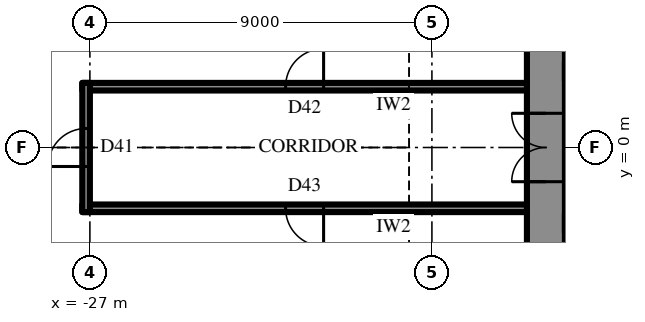
"""IFC4 building model, lengths in metres.
Left out: names, types, materials, properties, quantities, classifications, styles, units other than length and angle.
Written with IfcOpenShell. Run it as: python <this file> out.ifc"""

import sys

from ifc_helpers import new_model, si_unit, direction, frame, frame_2d, origin, place, context, subcontext, project, spatial, rectangle, extrude, element, fill, save


model = new_model("IFC4")
c1 = context("Model", 3, precision=1e-05, world=origin(), true_north=direction((0.0, 1.0)))
c2 = subcontext(c1, "Body", "Model", "MODEL_VIEW")
j1 = project(units=[si_unit("LENGTHUNIT", "METRE"), si_unit("PLANEANGLEUNIT", "RADIAN")], contexts=[c1])
p1 = place(None, origin())
s1 = spatial("IfcSite", under=j1, at=p1, CompositionType="ELEMENT")
p2 = place(p1, origin())
s2 = spatial("IfcBuilding", under=s1, at=p2, CompositionType="ELEMENT")
p3 = place(p2, frame((0.0, 0.0, 215.5)))
s3 = spatial("IfcBuildingStorey", under=s2, at=p3, CompositionType="ELEMENT", Elevation=215.5)
p4 = place(p3, frame((-15.0, 10.7, 0.0), z_axis=(0.0, 0.0, 1.0), x_axis=(0.0, -1.0, 0.0)))
e1 = element("IfcWall", 1, at=p4, inside=s3, PredefinedType="SHEAR", context=c2, shape_type="SweptSolid", body=[
    extrude(rectangle(XDim=21.4, YDim=1.0, at=frame_2d((10.7, 0.0))), origin(), (0.0, 0.0, 1.0), 4.2),
])
p5 = place(p4, frame((9.8, 0.0, 0.0)))
e2 = element("IfcOpeningElement", 2, at=p5, cuts=e1, PredefinedType="OPENING", context=c2, shape_type="SweptSolid", body=[
    extrude(rectangle(XDim=1.8, YDim=2.4, at=frame_2d((0.9, 1.2))), frame((0.0, 0.51, 0.0), z_axis=(0.0, -1.0, 0.0), x_axis=(1.0, 0.0, 0.0)), (0.0, 0.0, 1.0), 1.02),
])
p6 = place(p3, frame((-12.3, -2.0, 0.0), z_axis=(0.0, 0.0, 1.0), x_axis=(-1.0, 0.0, 0.0)))
e3 = element("IfcWall", 3, at=p6, inside=s3, PredefinedType="SHEAR", context=c2, shape_type="SweptSolid", body=[
    extrude(rectangle(XDim=2.2, YDim=0.5, at=frame_2d((1.1, 0.0))), origin(), (0.0, 0.0, 1.0), 4.2),
])
p7 = place(p6, frame((0.8, 0.0, 0.0)))
e4 = element("IfcOpeningElement", 4, at=p7, cuts=e3, PredefinedType="OPENING", context=c2, shape_type="SweptSolid", body=[
    extrude(rectangle(XDim=0.9, YDim=2.2, at=frame_2d((0.45, 1.1))), frame((0.0, 0.26, 0.0), z_axis=(0.0, -1.0, 0.0), x_axis=(1.0, 0.0, 0.0)), (0.0, 0.0, 1.0), 0.52),
])
p8 = place(p3, frame((-31.913, -2.425, 0.0), z_axis=(0.0, 0.0, 1.0), x_axis=(0.500001051461, -0.866024796723, 0.0)))
e5 = element("IfcWall", 5, at=p8, inside=s3, PredefinedType="SOLIDWALL", context=c2, shape_type="SweptSolid", body=[
    extrude(rectangle(XDim=27.713, YDim=0.3, at=frame_2d((13.856, 0.0))), origin(), (0.0, 0.0, 1.0), 2.0),
])
p9 = place(p8, frame((1.309, 0.0, 0.6)))
e6 = element("IfcOpeningElement", 6, at=p9, cuts=e5, PredefinedType="OPENING", context=c2, shape_type="SweptSolid", body=[
    extrude(rectangle(XDim=2.0, YDim=1.15, at=frame_2d((1.0, 0.575))), frame((0.0, 0.16, 0.0), z_axis=(0.0, -1.0, 0.0), x_axis=(1.0, 0.0, 0.0)), (0.0, 0.0, 1.0), 0.32),
])
p10 = place(p8, frame((5.928, 0.0, 0.6)))
e7 = element("IfcOpeningElement", 7, at=p10, cuts=e5, PredefinedType="OPENING", context=c2, shape_type="SweptSolid", body=[
    extrude(rectangle(XDim=2.0, YDim=1.15, at=frame_2d((1.0, 0.575))), frame((0.0, 0.16, 0.0), z_axis=(0.0, -1.0, 0.0), x_axis=(1.0, 0.0, 0.0)), (0.0, 0.0, 1.0), 0.32),
])
p11 = place(p8, frame((10.547, 0.0, 0.6)))
e8 = element("IfcOpeningElement", 8, at=p11, cuts=e5, PredefinedType="OPENING", context=c2, shape_type="SweptSolid", body=[
    extrude(rectangle(XDim=2.0, YDim=1.15, at=frame_2d((1.0, 0.575))), frame((0.0, 0.16, 0.0), z_axis=(0.0, -1.0, 0.0), x_axis=(1.0, 0.0, 0.0)), (0.0, 0.0, 1.0), 0.32),
])
p12 = place(p8, frame((15.166, 0.0, 0.6)))
e9 = element("IfcOpeningElement", 9, at=p12, cuts=e5, PredefinedType="OPENING", context=c2, shape_type="SweptSolid", body=[
    extrude(rectangle(XDim=2.0, YDim=1.15, at=frame_2d((1.0, 0.575))), frame((0.0, 0.16, 0.0), z_axis=(0.0, -1.0, 0.0), x_axis=(1.0, 0.0, 0.0)), (0.0, 0.0, 1.0), 0.32),
])
p13 = place(p8, frame((19.785, 0.0, 0.6)))
e10 = element("IfcOpeningElement", 10, at=p13, cuts=e5, PredefinedType="OPENING", context=c2, shape_type="SweptSolid", body=[
    extrude(rectangle(XDim=2.0, YDim=1.15, at=frame_2d((1.0, 0.575))), frame((0.0, 0.16, 0.0), z_axis=(0.0, -1.0, 0.0), x_axis=(1.0, 0.0, 0.0)), (0.0, 0.0, 1.0), 0.32),
])
p14 = place(p8, frame((24.403, 0.0, 0.6)))
e11 = element("IfcOpeningElement", 11, at=p14, cuts=e5, PredefinedType="OPENING", context=c2, shape_type="SweptSolid", body=[
    extrude(rectangle(XDim=2.0, YDim=1.15, at=frame_2d((1.0, 0.575))), frame((0.0, 0.16, 0.0), z_axis=(0.0, -1.0, 0.0), x_axis=(1.0, 0.0, 0.0)), (0.0, 0.0, 1.0), 0.32),
])
p15 = place(p3, frame((-15.5, 1.6, 0.0), z_axis=(0.0, 0.0, 1.0), x_axis=(-1.0, 0.0, 0.0)))
e12 = element("IfcWall", 12, at=p15, inside=s3, PredefinedType="PARTITIONING", context=c2, shape_type="SweptSolid", body=[
    extrude(rectangle(XDim=11.7, YDim=0.2, at=frame_2d((5.85, 0.0))), origin(), (0.0, 0.0, 1.0), 4.0),
])
p16 = place(p15, frame((5.35, 0.0, 0.0)))
e13 = element("IfcOpeningElement", 13, at=p16, cuts=e12, PredefinedType="OPENING", context=c2, shape_type="SweptSolid", body=[
    extrude(rectangle(XDim=1.0, YDim=2.2, at=frame_2d((0.5, 1.1))), frame((0.0, 0.11, 0.0), z_axis=(0.0, -1.0, 0.0), x_axis=(1.0, 0.0, 0.0)), (0.0, 0.0, 1.0), 0.22),
])
p17 = place(p3, frame((-15.5, -1.6, 0.0), z_axis=(0.0, 0.0, 1.0), x_axis=(-1.0, 0.0, 0.0)))
e14 = element("IfcWall", 14, at=p17, inside=s3, PredefinedType="PARTITIONING", context=c2, shape_type="SweptSolid", body=[
    extrude(rectangle(XDim=11.7, YDim=0.2, at=frame_2d((5.85, 0.0))), origin(), (0.0, 0.0, 1.0), 4.0),
])
p18 = place(p17, frame((5.35, 0.0, 0.0)))
e15 = element("IfcOpeningElement", 15, at=p18, cuts=e14, PredefinedType="OPENING", context=c2, shape_type="SweptSolid", body=[
    extrude(rectangle(XDim=1.0, YDim=2.2, at=frame_2d((0.5, 1.1))), frame((0.0, 0.11, 0.0), z_axis=(0.0, -1.0, 0.0), x_axis=(1.0, 0.0, 0.0)), (0.0, 0.0, 1.0), 0.22),
])
p19 = place(p3, frame((-27.1, -1.7, 0.0), z_axis=(0.0, 0.0, 1.0), x_axis=(0.0, 1.0, 0.0)))
e16 = element("IfcWall", 16, at=p19, inside=s3, PredefinedType="PARTITIONING", context=c2, shape_type="SweptSolid", body=[
    extrude(rectangle(XDim=3.4, YDim=0.2, at=frame_2d((1.7, 0.0))), origin(), (0.0, 0.0, 1.0), 4.0),
])
p20 = place(p19, frame((1.2, 0.0, 0.0)))
e17 = element("IfcOpeningElement", 17, at=p20, cuts=e16, PredefinedType="OPENING", context=c2, shape_type="SweptSolid", body=[
    extrude(rectangle(XDim=1.0, YDim=2.2, at=frame_2d((0.5, 1.1))), frame((0.0, 0.11, 0.0), z_axis=(0.0, -1.0, 0.0), x_axis=(1.0, 0.0, 0.0)), (0.0, 0.0, 1.0), 0.22),
])
p21 = place(p5, frame((1.8, 0.0, 0.0), z_axis=(0.0, 0.0, 1.0), x_axis=(-1.0, 0.0, 0.0)))
e18 = element("IfcDoor", 18, at=p21, inside=s3, OperationType="DOUBLE_DOOR_SINGLE_SWING", PredefinedType="DOOR", context=c2, shape_type="SweptSolid", body=[
    extrude(rectangle(XDim=1.8, YDim=2.4, at=frame_2d((0.9, 1.2))), frame((0.0, 0.025, 0.0), z_axis=(0.0, -1.0, 0.0), x_axis=(1.0, 0.0, 0.0)), (0.0, 0.0, 1.0), 0.05),
])
fill(e2, e18)
p22 = place(p16, frame((1.0, 0.0, 0.0), z_axis=(0.0, 0.0, 1.0), x_axis=(-1.0, 0.0, 0.0)))
e19 = element("IfcDoor", 19, at=p22, inside=s3, OperationType="SINGLE_SWING_LEFT", PredefinedType="DOOR", context=c2, shape_type="SweptSolid", body=[
    extrude(rectangle(XDim=1.0, YDim=2.2, at=frame_2d((0.5, 1.1))), frame((0.0, 0.025, 0.0), z_axis=(0.0, -1.0, 0.0), x_axis=(1.0, 0.0, 0.0)), (0.0, 0.0, 1.0), 0.05),
])
fill(e13, e19)
p23 = place(p18, origin())
e20 = element("IfcDoor", 20, at=p23, inside=s3, OperationType="SINGLE_SWING_RIGHT", PredefinedType="DOOR", context=c2, shape_type="SweptSolid", body=[
    extrude(rectangle(XDim=1.0, YDim=2.2, at=frame_2d((0.5, 1.1))), frame((0.0, 0.025, 0.0), z_axis=(0.0, -1.0, 0.0), x_axis=(1.0, 0.0, 0.0)), (0.0, 0.0, 1.0), 0.05),
])
fill(e15, e20)
p24 = place(p20, origin())
e21 = element("IfcDoor", 21, at=p24, inside=s3, OperationType="SINGLE_SWING_RIGHT", PredefinedType="DOOR", context=c2, shape_type="SweptSolid", body=[
    extrude(rectangle(XDim=1.0, YDim=2.2, at=frame_2d((0.5, 1.1))), frame((0.0, 0.025, 0.0), z_axis=(0.0, -1.0, 0.0), x_axis=(1.0, 0.0, 0.0)), (0.0, 0.0, 1.0), 0.05),
])
fill(e17, e21)
save(model, sys.argv[1])
